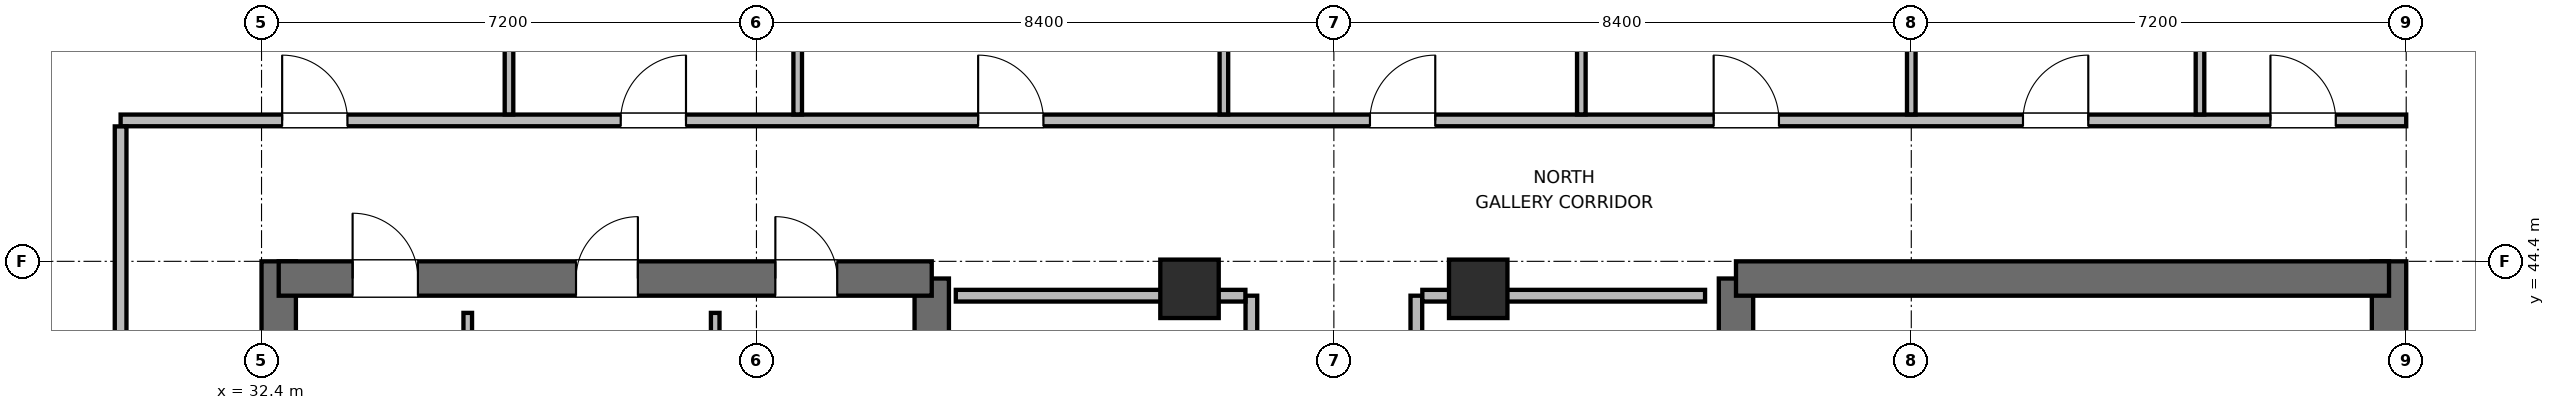
"""IFC4 building model, lengths in metres.
Left out: names, types, materials, properties, quantities, classifications, styles, units other than length and angle.
Written with IfcOpenShell. Run it as: python <this file> out.ifc"""

import sys

from ifc_helpers import new_model, si_unit, direction, frame, frame_2d, origin, origin_2d, place, context, subcontext, project, spatial, rectangle, extrude, element, fill, save


model = new_model("IFC4")
c1 = context("Model", 3, precision=1e-05, world=origin(), true_north=direction((0.0, 1.0)))
c2 = subcontext(c1, "Body", "Model", "MODEL_VIEW")
j1 = project(units=[si_unit("LENGTHUNIT", "METRE"), si_unit("PLANEANGLEUNIT", "RADIAN")], contexts=[c1])
p1 = place(None, origin())
s1 = spatial("IfcSite", under=j1, at=p1, CompositionType="ELEMENT")
p2 = place(p1, origin())
s2 = spatial("IfcBuilding", under=s1, at=p2, CompositionType="ELEMENT")
p3 = place(p2, frame((0.0, 0.0, 270.6)))
s3 = spatial("IfcBuildingStorey", under=s2, at=p3, CompositionType="ELEMENT", Elevation=270.6)
p4 = place(p3, frame((32.65, 27.6, 0.0), z_axis=(0.0, 0.0, 1.0), x_axis=(0.0, 1.0, 0.0)))
e1 = element("IfcWall", 1, at=p4, inside=s3, PredefinedType="SHEAR", context=c2, shape_type="SweptSolid", body=[
    extrude(rectangle(XDim=16.8, YDim=0.5, at=frame_2d((8.4, 0.0))), origin(), (0.0, 0.0, 1.0), 3.9),
])
p5 = place(p3, frame((42.15, 37.8, 0.0), z_axis=(0.0, 0.0, 1.0), x_axis=(0.0, 1.0, 0.0)))
e2 = element("IfcWall", 2, at=p5, inside=s3, PredefinedType="SHEAR", context=c2, shape_type="SweptSolid", body=[
    extrude(rectangle(XDim=6.35, YDim=0.5, at=frame_2d((3.175, 0.0))), origin(), (0.0, 0.0, 1.0), 3.9),
])
p6 = place(p3, frame((32.65, 44.15, 0.0), z_axis=(0.0, 0.0, 1.0), x_axis=(1.0, 0.0, 0.0)))
e3 = element("IfcWall", 3, at=p6, inside=s3, PredefinedType="SHEAR", context=c2, shape_type="SweptSolid", body=[
    extrude(rectangle(XDim=9.5, YDim=0.5, at=frame_2d((4.75, 0.0))), origin(), (0.0, 0.0, 1.0), 3.9),
])
p7 = place(p6, frame((1.075, 0.0, 0.0)))
e4 = element("IfcOpeningElement", 4, at=p7, cuts=e3, PredefinedType="OPENING", context=c2, shape_type="SweptSolid", body=[
    extrude(rectangle(XDim=0.95, YDim=2.04, at=frame_2d((0.475, 1.02))), frame((0.0, 0.26, 0.0), z_axis=(0.0, -1.0, 0.0), x_axis=(1.0, 0.0, 0.0)), (0.0, 0.0, 1.0), 0.52),
])
p8 = place(p6, frame((4.325, 0.0, 0.0)))
e5 = element("IfcOpeningElement", 5, at=p8, cuts=e3, PredefinedType="OPENING", context=c2, shape_type="SweptSolid", body=[
    extrude(rectangle(XDim=0.9, YDim=2.02, at=frame_2d((0.45, 1.01))), frame((0.0, 0.26, 0.0), z_axis=(0.0, -1.0, 0.0), x_axis=(1.0, 0.0, 0.0)), (0.0, 0.0, 1.0), 0.52),
])
p9 = place(p6, frame((7.225, 0.0, 0.0)))
e6 = element("IfcOpeningElement", 6, at=p9, cuts=e3, PredefinedType="OPENING", context=c2, shape_type="SweptSolid", body=[
    extrude(rectangle(XDim=0.9, YDim=2.02, at=frame_2d((0.45, 1.01))), frame((0.0, 0.26, 0.0), z_axis=(0.0, -1.0, 0.0), x_axis=(1.0, 0.0, 0.0)), (0.0, 0.0, 1.0), 0.52),
])
p10 = place(p3, frame((53.85, 38.0, 0.0), z_axis=(0.0, 0.0, 1.0), x_axis=(0.0, 1.0, 0.0)))
e7 = element("IfcWall", 7, at=p10, inside=s3, PredefinedType="SHEAR", context=c2, shape_type="SweptSolid", body=[
    extrude(rectangle(XDim=6.15, YDim=0.5, at=frame_2d((3.075, 0.0))), origin(), (0.0, 0.0, 1.0), 3.9),
])
p11 = place(p3, frame((63.35, 27.6, 0.0), z_axis=(0.0, 0.0, 1.0), x_axis=(0.0, 1.0, 0.0)))
e8 = element("IfcWall", 8, at=p11, inside=s3, PredefinedType="SHEAR", context=c2, shape_type="SweptSolid", body=[
    extrude(rectangle(XDim=16.8, YDim=0.5, at=frame_2d((8.4, 0.0))), origin(), (0.0, 0.0, 1.0), 3.9),
])
p12 = place(p3, frame((53.85, 44.15, 0.0), z_axis=(0.0, 0.0, 1.0), x_axis=(1.0, 0.0, 0.0)))
e9 = element("IfcWall", 9, at=p12, inside=s3, PredefinedType="SHEAR", context=c2, shape_type="SweptSolid", body=[
    extrude(rectangle(XDim=9.5, YDim=0.5, at=frame_2d((4.75, 0.0))), origin(), (0.0, 0.0, 1.0), 3.9),
])
for number, where, z_axis, x_axis in (
    (10, (45.9, 44.0, 0.0), (0.0, 0.0, 1.0), (1.0, 0.0, 0.0)),
    (11, (50.1, 44.0, 0.0), (0.0, 0.0, 1.0), (1.0, 0.0, 0.0)),
):
    element("IfcColumn", number, at=place(p3, frame(where, z_axis=z_axis, x_axis=x_axis)), inside=s3, PredefinedType="COLUMN", context=c2, shape_type="SweptSolid", body=[
        extrude(rectangle(XDim=0.85, YDim=0.85, at=origin_2d()), origin(), (0.0, 0.0, 1.0), 3.9),
    ])
for number, where, z_axis, x_axis in (
    (12, (35.4, 41.095, 0.0), (0.0, 0.0, 1.0), (0.0, 1.0, 0.0)),
    (13, (39.0, 41.095, 0.0), (0.0, 0.0, 1.0), (0.0, 1.0, 0.0)),
):
    element("IfcWall", number, at=place(p3, frame(where, z_axis=z_axis, x_axis=x_axis)), inside=s3, PredefinedType="PARTITIONING", context=c2, shape_type="SweptSolid", body=[
        extrude(rectangle(XDim=2.555, YDim=0.125, at=frame_2d((1.277, 0.0))), origin(), (0.0, 0.0, 1.0), 3.68),
    ])
p13 = place(p3, frame((46.8, 37.9, 0.0), z_axis=(0.0, 0.0, 1.0), x_axis=(0.0, 1.0, 0.0)))
e14 = element("IfcWall", 14, at=p13, inside=s3, PredefinedType="PARTITIONING", context=c2, shape_type="SweptSolid", body=[
    extrude(rectangle(XDim=6.0, YDim=0.17, at=frame_2d((3.0, 0.0))), origin(), (0.0, 0.0, 1.0), 3.68),
])
p14 = place(p13, frame((0.54, 0.0, 0.0)))
e15 = element("IfcOpeningElement", 15, at=p14, cuts=e14, PredefinedType="OPENING", context=c2, shape_type="SweptSolid", body=[
    extrude(rectangle(XDim=0.9, YDim=2.02, at=frame_2d((0.45, 1.01))), frame((0.0, 0.095, 0.0), z_axis=(0.0, -1.0, 0.0), x_axis=(1.0, 0.0, 0.0)), (0.0, 0.0, 1.0), 0.19),
])
p15 = place(p13, frame((2.55, 0.0, 0.0)))
e16 = element("IfcOpeningElement", 16, at=p15, cuts=e14, PredefinedType="OPENING", context=c2, shape_type="SweptSolid", body=[
    extrude(rectangle(XDim=0.9, YDim=2.02, at=frame_2d((0.45, 1.01))), frame((0.0, 0.095, 0.0), z_axis=(0.0, -1.0, 0.0), x_axis=(1.0, 0.0, 0.0)), (0.0, 0.0, 1.0), 0.19),
])
p16 = place(p13, frame((4.56, 0.0, 0.0)))
e17 = element("IfcOpeningElement", 17, at=p16, cuts=e14, PredefinedType="OPENING", context=c2, shape_type="SweptSolid", body=[
    extrude(rectangle(XDim=0.9, YDim=2.02, at=frame_2d((0.45, 1.01))), frame((0.0, 0.095, 0.0), z_axis=(0.0, -1.0, 0.0), x_axis=(1.0, 0.0, 0.0)), (0.0, 0.0, 1.0), 0.19),
])
p17 = place(p3, frame((42.5, 43.9, 0.0), z_axis=(0.0, 0.0, 1.0), x_axis=(1.0, 0.0, 0.0)))
e18 = element("IfcWall", 18, at=p17, inside=s3, PredefinedType="PARTITIONING", context=c2, shape_type="SweptSolid", body=[
    extrude(rectangle(XDim=4.213, YDim=0.17, at=frame_2d((2.106, 0.0))), origin(), (0.0, 0.0, 1.0), 2.765),
])
p18 = place(p3, frame((49.2, 37.9, 0.0), z_axis=(0.0, 0.0, 1.0), x_axis=(0.0, 1.0, 0.0)))
e19 = element("IfcWall", 19, at=p18, inside=s3, PredefinedType="PARTITIONING", context=c2, shape_type="SweptSolid", body=[
    extrude(rectangle(XDim=6.0, YDim=0.17, at=frame_2d((3.0, 0.0))), origin(), (0.0, 0.0, 1.0), 3.68),
])
p19 = place(p18, frame((0.69, 0.0, 0.0)))
e20 = element("IfcOpeningElement", 20, at=p19, cuts=e19, PredefinedType="OPENING", context=c2, shape_type="SweptSolid", body=[
    extrude(rectangle(XDim=0.9, YDim=2.02, at=frame_2d((0.45, 1.01))), frame((0.0, 0.095, 0.0), z_axis=(0.0, -1.0, 0.0), x_axis=(1.0, 0.0, 0.0)), (0.0, 0.0, 1.0), 0.19),
])
p20 = place(p18, frame((3.69, 0.0, 0.0)))
e21 = element("IfcOpeningElement", 21, at=p20, cuts=e19, PredefinedType="OPENING", context=c2, shape_type="SweptSolid", body=[
    extrude(rectangle(XDim=0.9, YDim=2.02, at=frame_2d((0.45, 1.01))), frame((0.0, 0.095, 0.0), z_axis=(0.0, -1.0, 0.0), x_axis=(1.0, 0.0, 0.0)), (0.0, 0.0, 1.0), 0.19),
])
p21 = place(p3, frame((49.287, 43.9, 0.0), z_axis=(0.0, 0.0, 1.0), x_axis=(1.0, 0.0, 0.0)))
e22 = element("IfcWall", 22, at=p21, inside=s3, PredefinedType="PARTITIONING", context=c2, shape_type="SweptSolid", body=[
    extrude(rectangle(XDim=4.113, YDim=0.17, at=frame_2d((2.056, 0.0))), origin(), (0.0, 0.0, 1.0), 2.765),
])
p22 = place(p3, frame((30.35, 46.45, 0.0), z_axis=(0.0, 0.0, 1.0), x_axis=(1.0, 0.0, 0.0)))
e23 = element("IfcWall", 23, at=p22, inside=s3, PredefinedType="PARTITIONING", context=c2, shape_type="SweptSolid", body=[
    extrude(rectangle(XDim=33.25, YDim=0.17, at=frame_2d((16.625, 0.0))), origin(), (0.0, 0.0, 1.0), 3.68),
])
p23 = place(p22, frame((2.35, 0.0, 0.0)))
e24 = element("IfcOpeningElement", 24, at=p23, cuts=e23, PredefinedType="OPENING", context=c2, shape_type="SweptSolid", body=[
    extrude(rectangle(XDim=0.95, YDim=2.04, at=frame_2d((0.475, 1.02))), frame((0.0, 0.095, 0.0), z_axis=(0.0, -1.0, 0.0), x_axis=(1.0, 0.0, 0.0)), (0.0, 0.0, 1.0), 0.19),
])
p24 = place(p22, frame((7.275, 0.0, 0.0)))
e25 = element("IfcOpeningElement", 25, at=p24, cuts=e23, PredefinedType="OPENING", context=c2, shape_type="SweptSolid", body=[
    extrude(rectangle(XDim=0.95, YDim=2.04, at=frame_2d((0.475, 1.02))), frame((0.0, 0.095, 0.0), z_axis=(0.0, -1.0, 0.0), x_axis=(1.0, 0.0, 0.0)), (0.0, 0.0, 1.0), 0.19),
])
p25 = place(p22, frame((12.475, 0.0, 0.0)))
e26 = element("IfcOpeningElement", 26, at=p25, cuts=e23, PredefinedType="OPENING", context=c2, shape_type="SweptSolid", body=[
    extrude(rectangle(XDim=0.95, YDim=2.04, at=frame_2d((0.475, 1.02))), frame((0.0, 0.095, 0.0), z_axis=(0.0, -1.0, 0.0), x_axis=(1.0, 0.0, 0.0)), (0.0, 0.0, 1.0), 0.19),
])
p26 = place(p22, frame((18.175, 0.0, 0.0)))
e27 = element("IfcOpeningElement", 27, at=p26, cuts=e23, PredefinedType="OPENING", context=c2, shape_type="SweptSolid", body=[
    extrude(rectangle(XDim=0.95, YDim=2.04, at=frame_2d((0.475, 1.02))), frame((0.0, 0.095, 0.0), z_axis=(0.0, -1.0, 0.0), x_axis=(1.0, 0.0, 0.0)), (0.0, 0.0, 1.0), 0.19),
])
p27 = place(p22, frame((23.175, 0.0, 0.0)))
e28 = element("IfcOpeningElement", 28, at=p27, cuts=e23, PredefinedType="OPENING", context=c2, shape_type="SweptSolid", body=[
    extrude(rectangle(XDim=0.95, YDim=2.04, at=frame_2d((0.475, 1.02))), frame((0.0, 0.095, 0.0), z_axis=(0.0, -1.0, 0.0), x_axis=(1.0, 0.0, 0.0)), (0.0, 0.0, 1.0), 0.19),
])
p28 = place(p22, frame((27.675, 0.0, 0.0)))
e29 = element("IfcOpeningElement", 29, at=p28, cuts=e23, PredefinedType="OPENING", context=c2, shape_type="SweptSolid", body=[
    extrude(rectangle(XDim=0.95, YDim=2.04, at=frame_2d((0.475, 1.02))), frame((0.0, 0.095, 0.0), z_axis=(0.0, -1.0, 0.0), x_axis=(1.0, 0.0, 0.0)), (0.0, 0.0, 1.0), 0.19),
])
p29 = place(p22, frame((31.275, 0.0, 0.0)))
e30 = element("IfcOpeningElement", 30, at=p29, cuts=e23, PredefinedType="OPENING", context=c2, shape_type="SweptSolid", body=[
    extrude(rectangle(XDim=0.95, YDim=2.04, at=frame_2d((0.475, 1.02))), frame((0.0, 0.095, 0.0), z_axis=(0.0, -1.0, 0.0), x_axis=(1.0, 0.0, 0.0)), (0.0, 0.0, 1.0), 0.19),
])
p30 = place(p3, frame((30.35, 25.637, 0.0), z_axis=(0.0, 0.0, 1.0), x_axis=(0.0, 1.0, 0.0)))
e31 = element("IfcWall", 31, at=p30, inside=s3, PredefinedType="PARTITIONING", context=c2, shape_type="SweptSolid", body=[
    extrude(rectangle(XDim=20.726, YDim=0.17, at=frame_2d((10.363, 0.0))), origin(), (0.0, 0.0, 1.0), 3.68),
])
p31 = place(p30, frame((9.888, 0.0, 0.0)))
e32 = element("IfcOpeningElement", 32, at=p31, cuts=e31, PredefinedType="OPENING", context=c2, shape_type="SweptSolid", body=[
    extrude(rectangle(XDim=0.95, YDim=2.04, at=frame_2d((0.475, 1.02))), frame((0.0, 0.095, 0.0), z_axis=(0.0, -1.0, 0.0), x_axis=(1.0, 0.0, 0.0)), (0.0, 0.0, 1.0), 0.19),
])
p32 = place(p3, frame((36.0, 46.537, 0.0), z_axis=(0.0, 0.0, 1.0), x_axis=(0.0, 1.0, 0.0)))
e33 = element("IfcWall", 33, at=p32, inside=s3, PredefinedType="PARTITIONING", context=c2, shape_type="SweptSolid", body=[
    extrude(rectangle(XDim=6.628, YDim=0.125, at=frame_2d((3.314, 0.0))), origin(), (0.0, 0.0, 1.0), 3.68),
])
p33 = place(p3, frame((40.2, 46.537, 0.0), z_axis=(0.0, 0.0, 1.0), x_axis=(0.0, 1.0, 0.0)))
e34 = element("IfcWall", 34, at=p33, inside=s3, PredefinedType="PARTITIONING", context=c2, shape_type="SweptSolid", body=[
    extrude(rectangle(XDim=6.628, YDim=0.125, at=frame_2d((3.314, 0.0))), origin(), (0.0, 0.0, 1.0), 3.043),
])
p34 = place(p3, frame((46.4, 46.537, 0.0), z_axis=(0.0, 0.0, 1.0), x_axis=(0.0, 1.0, 0.0)))
e35 = element("IfcWall", 35, at=p34, inside=s3, PredefinedType="PARTITIONING", context=c2, shape_type="SweptSolid", body=[
    extrude(rectangle(XDim=5.388, YDim=0.125, at=frame_2d((2.694, 0.0))), origin(), (0.0, 0.0, 1.0), 3.68),
])
p35 = place(p3, frame((51.6, 46.537, 0.0), z_axis=(0.0, 0.0, 1.0), x_axis=(0.0, 1.0, 0.0)))
e36 = element("IfcWall", 36, at=p35, inside=s3, PredefinedType="PARTITIONING", context=c2, shape_type="SweptSolid", body=[
    extrude(rectangle(XDim=3.308, YDim=0.125, at=frame_2d((1.654, 0.0))), origin(), (0.0, 0.0, 1.0), 3.68),
])
p36 = place(p3, frame((56.4, 46.537, 0.0), z_axis=(0.0, 0.0, 1.0), x_axis=(0.0, 1.0, 0.0)))
e37 = element("IfcWall", 37, at=p36, inside=s3, PredefinedType="PARTITIONING", context=c2, shape_type="SweptSolid", body=[
    extrude(rectangle(XDim=6.588, YDim=0.125, at=frame_2d((3.294, 0.0))), origin(), (0.0, 0.0, 1.0), 3.043),
])
p37 = place(p3, frame((60.6, 46.537, 0.0), z_axis=(0.0, 0.0, 1.0), x_axis=(0.0, 1.0, 0.0)))
e38 = element("IfcWall", 38, at=p37, inside=s3, PredefinedType="PARTITIONING", context=c2, shape_type="SweptSolid", body=[
    extrude(rectangle(XDim=6.588, YDim=0.125, at=frame_2d((3.294, 0.0))), origin(), (0.0, 0.0, 1.0), 3.68),
])
p38 = place(p7, origin())
e39 = element("IfcDoor", 39, at=p38, inside=s3, OperationType="SINGLE_SWING_LEFT", PredefinedType="DOOR", context=c2, shape_type="SweptSolid", body=[
    extrude(rectangle(XDim=0.95, YDim=2.04, at=frame_2d((0.475, 1.02))), frame((0.0, 0.025, 0.0), z_axis=(0.0, -1.0, 0.0), x_axis=(1.0, 0.0, 0.0)), (0.0, 0.0, 1.0), 0.05),
])
fill(e4, e39)
p39 = place(p8, origin())
e40 = element("IfcDoor", 40, at=p39, inside=s3, OperationType="SINGLE_SWING_RIGHT", PredefinedType="DOOR", context=c2, shape_type="SweptSolid", body=[
    extrude(rectangle(XDim=0.9, YDim=2.02, at=frame_2d((0.45, 1.01))), frame((0.0, 0.025, 0.0), z_axis=(0.0, -1.0, 0.0), x_axis=(1.0, 0.0, 0.0)), (0.0, 0.0, 1.0), 0.05),
])
fill(e5, e40)
p40 = place(p9, origin())
e41 = element("IfcDoor", 41, at=p40, inside=s3, OperationType="SINGLE_SWING_LEFT", PredefinedType="DOOR", context=c2, shape_type="SweptSolid", body=[
    extrude(rectangle(XDim=0.9, YDim=2.02, at=frame_2d((0.45, 1.01))), frame((0.0, 0.025, 0.0), z_axis=(0.0, -1.0, 0.0), x_axis=(1.0, 0.0, 0.0)), (0.0, 0.0, 1.0), 0.05),
])
fill(e6, e41)
p41 = place(p23, origin())
e42 = element("IfcDoor", 42, at=p41, inside=s3, OperationType="SINGLE_SWING_LEFT", PredefinedType="DOOR", context=c2, shape_type="SweptSolid", body=[
    extrude(rectangle(XDim=0.95, YDim=2.04, at=frame_2d((0.475, 1.02))), frame((0.0, 0.025, 0.0), z_axis=(0.0, -1.0, 0.0), x_axis=(1.0, 0.0, 0.0)), (0.0, 0.0, 1.0), 0.05),
])
fill(e24, e42)
p42 = place(p24, origin())
e43 = element("IfcDoor", 43, at=p42, inside=s3, OperationType="SINGLE_SWING_RIGHT", PredefinedType="DOOR", context=c2, shape_type="SweptSolid", body=[
    extrude(rectangle(XDim=0.95, YDim=2.04, at=frame_2d((0.475, 1.02))), frame((0.0, 0.025, 0.0), z_axis=(0.0, -1.0, 0.0), x_axis=(1.0, 0.0, 0.0)), (0.0, 0.0, 1.0), 0.05),
])
fill(e25, e43)
p43 = place(p25, origin())
e44 = element("IfcDoor", 44, at=p43, inside=s3, OperationType="SINGLE_SWING_LEFT", PredefinedType="DOOR", context=c2, shape_type="SweptSolid", body=[
    extrude(rectangle(XDim=0.95, YDim=2.04, at=frame_2d((0.475, 1.02))), frame((0.0, 0.025, 0.0), z_axis=(0.0, -1.0, 0.0), x_axis=(1.0, 0.0, 0.0)), (0.0, 0.0, 1.0), 0.05),
])
fill(e26, e44)
p44 = place(p26, origin())
e45 = element("IfcDoor", 45, at=p44, inside=s3, OperationType="SINGLE_SWING_RIGHT", PredefinedType="DOOR", context=c2, shape_type="SweptSolid", body=[
    extrude(rectangle(XDim=0.95, YDim=2.04, at=frame_2d((0.475, 1.02))), frame((0.0, 0.025, 0.0), z_axis=(0.0, -1.0, 0.0), x_axis=(1.0, 0.0, 0.0)), (0.0, 0.0, 1.0), 0.05),
])
fill(e27, e45)
p45 = place(p27, origin())
e46 = element("IfcDoor", 46, at=p45, inside=s3, OperationType="SINGLE_SWING_LEFT", PredefinedType="DOOR", context=c2, shape_type="SweptSolid", body=[
    extrude(rectangle(XDim=0.95, YDim=2.04, at=frame_2d((0.475, 1.02))), frame((0.0, 0.025, 0.0), z_axis=(0.0, -1.0, 0.0), x_axis=(1.0, 0.0, 0.0)), (0.0, 0.0, 1.0), 0.05),
])
fill(e28, e46)
p46 = place(p28, origin())
e47 = element("IfcDoor", 47, at=p46, inside=s3, OperationType="SINGLE_SWING_RIGHT", PredefinedType="DOOR", context=c2, shape_type="SweptSolid", body=[
    extrude(rectangle(XDim=0.95, YDim=2.04, at=frame_2d((0.475, 1.02))), frame((0.0, 0.025, 0.0), z_axis=(0.0, -1.0, 0.0), x_axis=(1.0, 0.0, 0.0)), (0.0, 0.0, 1.0), 0.05),
])
fill(e29, e47)
p47 = place(p29, origin())
e48 = element("IfcDoor", 48, at=p47, inside=s3, OperationType="SINGLE_SWING_LEFT", PredefinedType="DOOR", context=c2, shape_type="SweptSolid", body=[
    extrude(rectangle(XDim=0.95, YDim=2.04, at=frame_2d((0.475, 1.02))), frame((0.0, 0.025, 0.0), z_axis=(0.0, -1.0, 0.0), x_axis=(1.0, 0.0, 0.0)), (0.0, 0.0, 1.0), 0.05),
])
fill(e30, e48)
save(model, sys.argv[1])
